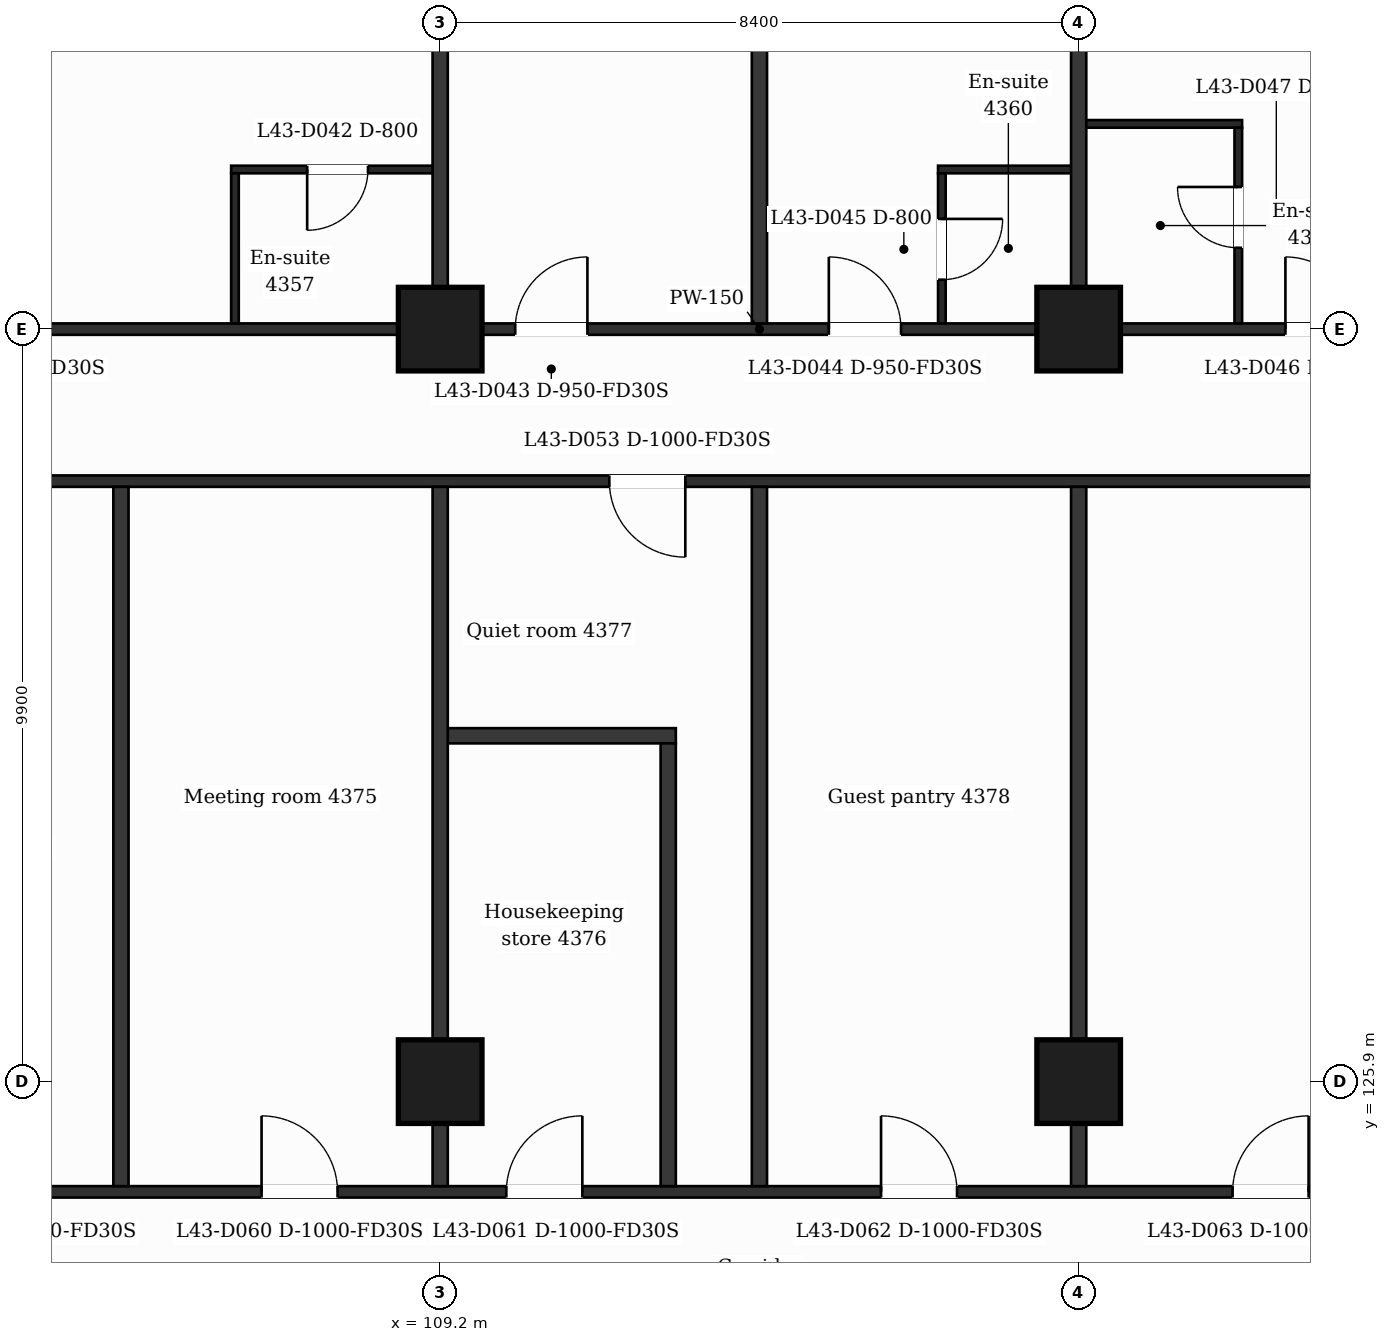
"""IFC4 building model, lengths in metres.
Left out: names, types, materials, properties, quantities, classifications, styles, units other than length and angle.
Written with IfcOpenShell. Run it as: python <this file> out.ifc"""

import sys

from ifc_helpers import new_model, si_unit, direction, frame, frame_2d, origin, origin_2d, place, context, subcontext, project, spatial, rectangle, extrude, element, fill, save


model = new_model("IFC4")
c1 = context("Model", 3, precision=1e-05, world=origin(), true_north=direction((0.0, 1.0)))
c2 = subcontext(c1, "Body", "Model", "MODEL_VIEW")
j1 = project(units=[si_unit("LENGTHUNIT", "METRE"), si_unit("PLANEANGLEUNIT", "RADIAN")], contexts=[c1])
p1 = place(None, origin())
s1 = spatial("IfcSite", under=j1, at=p1, CompositionType="ELEMENT")
p2 = place(p1, origin())
s2 = spatial("IfcBuilding", under=s1, at=p2, CompositionType="ELEMENT")
p3 = place(p2, frame((0.0, 0.0, 181.1)))
s3 = spatial("IfcBuildingStorey", under=s2, at=p3, CompositionType="ELEMENT", Elevation=181.1)
for number, where, z_axis, x_axis in (
    (1, (109.2, 125.9, 0.0), (0.0, 0.0, 1.0), (1.0, 0.0, 0.0)),
    (2, (117.6, 125.9, 0.0), (0.0, 0.0, 1.0), (1.0, 0.0, 0.0)),
    (3, (109.2, 135.8, 0.0), (0.0, 0.0, 1.0), (1.0, 0.0, 0.0)),
    (4, (117.6, 135.8, 0.0), (0.0, 0.0, 1.0), (1.0, 0.0, 0.0)),
):
    element("IfcColumn", number, at=place(p3, frame(where, z_axis=z_axis, x_axis=x_axis)), inside=s3, PredefinedType="COLUMN", context=c2, shape_type="SweptSolid", body=[
        extrude(rectangle(XDim=1.1, YDim=1.1, at=origin_2d()), origin(), (0.0, 0.0, 1.0), 3.7),
    ])
p4 = place(p3, frame((100.8, 124.45, 0.0), z_axis=(0.0, 0.0, 1.0), x_axis=(1.0, 0.0, 0.0)))
e5 = element("IfcWall", 5, at=p4, inside=s3, PredefinedType="PARTITIONING", context=c2, shape_type="SweptSolid", body=[
    extrude(rectangle(XDim=25.2, YDim=0.15, at=frame_2d((12.6, 0.0))), origin(), (0.0, 0.0, 1.0), 3.38),
])
p5 = place(p4, frame((0.975, 0.0, 0.0)))
e6 = element("IfcOpeningElement", 6, at=p5, cuts=e5, PredefinedType="OPENING", context=c2, shape_type="SweptSolid", body=[
    extrude(rectangle(XDim=1.0, YDim=2.1, at=frame_2d((0.5, 1.05))), frame((0.0, 0.085, 0.0), z_axis=(0.0, -1.0, 0.0), x_axis=(1.0, 0.0, 0.0)), (0.0, 0.0, 1.0), 0.17),
])
p6 = place(p4, frame((6.05, 0.0, 0.0)))
e7 = element("IfcOpeningElement", 7, at=p6, cuts=e5, PredefinedType="OPENING", context=c2, shape_type="SweptSolid", body=[
    extrude(rectangle(XDim=1.0, YDim=2.1, at=frame_2d((0.5, 1.05))), frame((0.0, 0.085, 0.0), z_axis=(0.0, -1.0, 0.0), x_axis=(1.0, 0.0, 0.0)), (0.0, 0.0, 1.0), 0.17),
])
p7 = place(p4, frame((9.27, 0.0, 0.0)))
e8 = element("IfcOpeningElement", 8, at=p7, cuts=e5, PredefinedType="OPENING", context=c2, shape_type="SweptSolid", body=[
    extrude(rectangle(XDim=1.0, YDim=2.1, at=frame_2d((0.5, 1.05))), frame((0.0, 0.085, 0.0), z_axis=(0.0, -1.0, 0.0), x_axis=(1.0, 0.0, 0.0)), (0.0, 0.0, 1.0), 0.17),
])
p8 = place(p4, frame((14.2, 0.0, 0.0)))
e9 = element("IfcOpeningElement", 9, at=p8, cuts=e5, PredefinedType="OPENING", context=c2, shape_type="SweptSolid", body=[
    extrude(rectangle(XDim=1.0, YDim=2.1, at=frame_2d((0.5, 1.05))), frame((0.0, 0.085, 0.0), z_axis=(0.0, -1.0, 0.0), x_axis=(1.0, 0.0, 0.0)), (0.0, 0.0, 1.0), 0.17),
])
p9 = place(p4, frame((18.825, 0.0, 0.0)))
e10 = element("IfcOpeningElement", 10, at=p9, cuts=e5, PredefinedType="OPENING", context=c2, shape_type="SweptSolid", body=[
    extrude(rectangle(XDim=1.0, YDim=2.1, at=frame_2d((0.5, 1.05))), frame((0.0, 0.085, 0.0), z_axis=(0.0, -1.0, 0.0), x_axis=(1.0, 0.0, 0.0)), (0.0, 0.0, 1.0), 0.17),
])
p10 = place(p3, frame((109.2, 130.45, 0.0), z_axis=(0.0, 0.0, 1.0), x_axis=(1.0, 0.0, 0.0)))
e11 = element("IfcWall", 11, at=p10, inside=s3, PredefinedType="PARTITIONING", context=c2, shape_type="SweptSolid", body=[
    extrude(rectangle(XDim=3.1, YDim=0.2, at=frame_2d((1.55, 0.0))), origin(), (0.0, 0.0, 1.0), 3.38),
])
p11 = place(p3, frame((100.725, 133.8, 0.0), z_axis=(0.0, 0.0, 1.0), x_axis=(1.0, 0.0, 0.0)))
e12 = element("IfcWall", 12, at=p11, inside=s3, PredefinedType="PARTITIONING", context=c2, shape_type="SweptSolid", body=[
    extrude(rectangle(XDim=25.35, YDim=0.15, at=frame_2d((12.675, 0.0))), origin(), (0.0, 0.0, 1.0), 3.38),
])
p12 = place(p11, frame((10.7, 0.0, 0.0)))
e13 = element("IfcOpeningElement", 13, at=p12, cuts=e12, PredefinedType="OPENING", context=c2, shape_type="SweptSolid", body=[
    extrude(rectangle(XDim=1.0, YDim=2.1, at=frame_2d((0.5, 1.05))), frame((0.0, 0.085, 0.0), z_axis=(0.0, -1.0, 0.0), x_axis=(1.0, 0.0, 0.0)), (0.0, 0.0, 1.0), 0.17),
])
p13 = place(p3, frame((90.895, 135.8, 0.0), z_axis=(0.0, 0.0, 1.0), x_axis=(1.0, 0.0, 0.0)))
e14 = element("IfcWall", 14, at=p13, inside=s3, PredefinedType="PARTITIONING", context=c2, shape_type="SweptSolid", body=[
    extrude(rectangle(XDim=45.011, YDim=0.15, at=frame_2d((22.505, 0.0))), origin(), (0.0, 0.0, 1.0), 3.38),
])
p14 = place(p13, frame((6.906, 0.0, 0.0)))
e15 = element("IfcOpeningElement", 15, at=p14, cuts=e14, PredefinedType="OPENING", context=c2, shape_type="SweptSolid", body=[
    extrude(rectangle(XDim=1.0, YDim=2.1, at=frame_2d((0.5, 1.05))), frame((0.0, 0.085, 0.0), z_axis=(0.0, -1.0, 0.0), x_axis=(1.0, 0.0, 0.0)), (0.0, 0.0, 1.0), 0.17),
])
p15 = place(p13, frame((11.875, 0.0, 0.0)))
e16 = element("IfcOpeningElement", 16, at=p15, cuts=e14, PredefinedType="OPENING", context=c2, shape_type="SweptSolid", body=[
    extrude(rectangle(XDim=0.95, YDim=2.1, at=frame_2d((0.475, 1.05))), frame((0.0, 0.085, 0.0), z_axis=(0.0, -1.0, 0.0), x_axis=(1.0, 0.0, 0.0)), (0.0, 0.0, 1.0), 0.17),
])
p16 = place(p13, frame((19.292, 0.0, 0.0)))
e17 = element("IfcOpeningElement", 17, at=p16, cuts=e14, PredefinedType="OPENING", context=c2, shape_type="SweptSolid", body=[
    extrude(rectangle(XDim=0.95, YDim=2.1, at=frame_2d((0.475, 1.05))), frame((0.0, 0.085, 0.0), z_axis=(0.0, -1.0, 0.0), x_axis=(1.0, 0.0, 0.0)), (0.0, 0.0, 1.0), 0.17),
])
p17 = place(p13, frame((23.418, 0.0, 0.0)))
e18 = element("IfcOpeningElement", 18, at=p17, cuts=e14, PredefinedType="OPENING", context=c2, shape_type="SweptSolid", body=[
    extrude(rectangle(XDim=0.95, YDim=2.1, at=frame_2d((0.475, 1.05))), frame((0.0, 0.085, 0.0), z_axis=(0.0, -1.0, 0.0), x_axis=(1.0, 0.0, 0.0)), (0.0, 0.0, 1.0), 0.17),
])
p18 = place(p13, frame((29.425, 0.0, 0.0)))
e19 = element("IfcOpeningElement", 19, at=p18, cuts=e14, PredefinedType="OPENING", context=c2, shape_type="SweptSolid", body=[
    extrude(rectangle(XDim=0.95, YDim=2.1, at=frame_2d((0.475, 1.05))), frame((0.0, 0.085, 0.0), z_axis=(0.0, -1.0, 0.0), x_axis=(1.0, 0.0, 0.0)), (0.0, 0.0, 1.0), 0.17),
])
p19 = place(p13, frame((31.63, 0.0, 0.0)))
e20 = element("IfcOpeningElement", 20, at=p19, cuts=e14, PredefinedType="OPENING", context=c2, shape_type="SweptSolid", body=[
    extrude(rectangle(XDim=0.95, YDim=2.1, at=frame_2d((0.475, 1.05))), frame((0.0, 0.085, 0.0), z_axis=(0.0, -1.0, 0.0), x_axis=(1.0, 0.0, 0.0)), (0.0, 0.0, 1.0), 0.17),
])
p20 = place(p13, frame((36.775, 0.0, 0.0)))
e21 = element("IfcOpeningElement", 21, at=p20, cuts=e14, PredefinedType="OPENING", context=c2, shape_type="SweptSolid", body=[
    extrude(rectangle(XDim=1.0, YDim=2.1, at=frame_2d((0.5, 1.05))), frame((0.0, 0.085, 0.0), z_axis=(0.0, -1.0, 0.0), x_axis=(1.0, 0.0, 0.0)), (0.0, 0.0, 1.0), 0.17),
])
p21 = place(p3, frame((106.45, 137.9, 0.0), z_axis=(0.0, 0.0, 1.0), x_axis=(1.0, 0.0, 0.0)))
e22 = element("IfcWall", 22, at=p21, inside=s3, PredefinedType="PARTITIONING", context=c2, shape_type="SweptSolid", body=[
    extrude(rectangle(XDim=2.75, YDim=0.1, at=frame_2d((1.375, 0.0))), origin(), (0.0, 0.0, 1.0), 3.38),
])
p22 = place(p21, frame((1.0, 0.0, 0.0)))
e23 = element("IfcOpeningElement", 23, at=p22, cuts=e22, PredefinedType="OPENING", context=c2, shape_type="SweptSolid", body=[
    extrude(rectangle(XDim=0.8, YDim=2.1, at=frame_2d((0.4, 1.05))), frame((0.0, 0.06, 0.0), z_axis=(0.0, -1.0, 0.0), x_axis=(1.0, 0.0, 0.0)), (0.0, 0.0, 1.0), 0.12),
])
p23 = place(p3, frame((115.75, 137.9, 0.0), z_axis=(0.0, 0.0, 1.0), x_axis=(1.0, 0.0, 0.0)))
e24 = element("IfcWall", 24, at=p23, inside=s3, PredefinedType="PARTITIONING", context=c2, shape_type="SweptSolid", body=[
    extrude(rectangle(XDim=1.85, YDim=0.1, at=frame_2d((0.925, 0.0))), origin(), (0.0, 0.0, 1.0), 3.38),
])
p24 = place(p3, frame((117.6, 138.5, 0.0), z_axis=(0.0, 0.0, 1.0), x_axis=(1.0, 0.0, 0.0)))
e25 = element("IfcWall", 25, at=p24, inside=s3, PredefinedType="PARTITIONING", context=c2, shape_type="SweptSolid", body=[
    extrude(rectangle(XDim=2.15, YDim=0.1, at=frame_2d((1.075, 0.0))), origin(), (0.0, 0.0, 1.0), 3.38),
])
p25 = place(p3, frame((105.0, 124.525, 0.0), z_axis=(0.0, 0.0, 1.0), x_axis=(0.0, 1.0, 0.0)))
e26 = element("IfcWall", 26, at=p25, inside=s3, PredefinedType="PARTITIONING", context=c2, shape_type="SweptSolid", body=[
    extrude(rectangle(XDim=9.2, YDim=0.2, at=frame_2d((4.6, 0.0))), origin(), (0.0, 0.0, 1.0), 3.38),
])
p26 = place(p3, frame((106.5, 135.875, 0.0), z_axis=(0.0, 0.0, 1.0), x_axis=(0.0, 1.0, 0.0)))
e27 = element("IfcWall", 27, at=p26, inside=s3, PredefinedType="PARTITIONING", context=c2, shape_type="SweptSolid", body=[
    extrude(rectangle(XDim=1.975, YDim=0.1, at=frame_2d((0.988, 0.0))), origin(), (0.0, 0.0, 1.0), 3.38),
])
p27 = place(p3, frame((109.2, 124.525, 0.0), z_axis=(0.0, 0.0, 1.0), x_axis=(0.0, 1.0, 0.0)))
e28 = element("IfcWall", 28, at=p27, inside=s3, PredefinedType="PARTITIONING", context=c2, shape_type="SweptSolid", body=[
    extrude(rectangle(XDim=9.2, YDim=0.2, at=frame_2d((4.6, 0.0))), origin(), (0.0, 0.0, 1.0), 3.38),
])
p28 = place(p3, frame((109.2, 135.875, 0.0), z_axis=(0.0, 0.0, 1.0), x_axis=(0.0, 1.0, 0.0)))
e29 = element("IfcWall", 29, at=p28, inside=s3, PredefinedType="PARTITIONING", context=c2, shape_type="SweptSolid", body=[
    extrude(rectangle(XDim=7.135, YDim=0.2, at=frame_2d((3.567, 0.0))), origin(), (0.0, 0.0, 1.0), 3.38),
])
p29 = place(p3, frame((112.2, 124.525, 0.0), z_axis=(0.0, 0.0, 1.0), x_axis=(0.0, 1.0, 0.0)))
e30 = element("IfcWall", 30, at=p29, inside=s3, PredefinedType="PARTITIONING", context=c2, shape_type="SweptSolid", body=[
    extrude(rectangle(XDim=5.825, YDim=0.2, at=frame_2d((2.913, 0.0))), origin(), (0.0, 0.0, 1.0), 3.38),
])
p30 = place(p3, frame((113.4, 124.525, 0.0), z_axis=(0.0, 0.0, 1.0), x_axis=(0.0, 1.0, 0.0)))
e31 = element("IfcWall", 31, at=p30, inside=s3, PredefinedType="PARTITIONING", context=c2, shape_type="SweptSolid", body=[
    extrude(rectangle(XDim=9.2, YDim=0.2, at=frame_2d((4.6, 0.0))), origin(), (0.0, 0.0, 1.0), 3.38),
])
p31 = place(p3, frame((113.4, 135.875, 0.0), z_axis=(0.0, 0.0, 1.0), x_axis=(0.0, 1.0, 0.0)))
e32 = element("IfcWall", 32, at=p31, inside=s3, PredefinedType="PARTITIONING", context=c2, shape_type="SweptSolid", body=[
    extrude(rectangle(XDim=8.085, YDim=0.2, at=frame_2d((4.042, 0.0))), origin(), (0.0, 0.0, 1.0), 3.38),
])
p32 = place(p3, frame((115.8, 135.875, 0.0), z_axis=(0.0, 0.0, 1.0), x_axis=(0.0, 1.0, 0.0)))
e33 = element("IfcWall", 33, at=p32, inside=s3, PredefinedType="PARTITIONING", context=c2, shape_type="SweptSolid", body=[
    extrude(rectangle(XDim=1.975, YDim=0.1, at=frame_2d((0.988, 0.0))), origin(), (0.0, 0.0, 1.0), 3.38),
])
p33 = place(p32, frame((0.575, 0.0, 0.0)))
e34 = element("IfcOpeningElement", 34, at=p33, cuts=e33, PredefinedType="OPENING", context=c2, shape_type="SweptSolid", body=[
    extrude(rectangle(XDim=0.8, YDim=2.1, at=frame_2d((0.4, 1.05))), frame((0.0, 0.06, 0.0), z_axis=(0.0, -1.0, 0.0), x_axis=(1.0, 0.0, 0.0)), (0.0, 0.0, 1.0), 0.12),
])
p34 = place(p3, frame((117.6, 124.525, 0.0), z_axis=(0.0, 0.0, 1.0), x_axis=(0.0, 1.0, 0.0)))
e35 = element("IfcWall", 35, at=p34, inside=s3, PredefinedType="PARTITIONING", context=c2, shape_type="SweptSolid", body=[
    extrude(rectangle(XDim=9.2, YDim=0.2, at=frame_2d((4.6, 0.0))), origin(), (0.0, 0.0, 1.0), 3.38),
])
p35 = place(p3, frame((117.6, 135.875, 0.0), z_axis=(0.0, 0.0, 1.0), x_axis=(0.0, 1.0, 0.0)))
e36 = element("IfcWall", 36, at=p35, inside=s3, PredefinedType="PARTITIONING", context=c2, shape_type="SweptSolid", body=[
    extrude(rectangle(XDim=7.135, YDim=0.2, at=frame_2d((3.567, 0.0))), origin(), (0.0, 0.0, 1.0), 3.38),
])
p36 = place(p3, frame((119.7, 135.875, 0.0), z_axis=(0.0, 0.0, 1.0), x_axis=(0.0, 1.0, 0.0)))
e37 = element("IfcWall", 37, at=p36, inside=s3, PredefinedType="PARTITIONING", context=c2, shape_type="SweptSolid", body=[
    extrude(rectangle(XDim=2.575, YDim=0.1, at=frame_2d((1.288, 0.0))), origin(), (0.0, 0.0, 1.0), 3.38),
])
p37 = place(p36, frame((0.995, 0.0, 0.0)))
e38 = element("IfcOpeningElement", 38, at=p37, cuts=e37, PredefinedType="OPENING", context=c2, shape_type="SweptSolid", body=[
    extrude(rectangle(XDim=0.8, YDim=2.1, at=frame_2d((0.4, 1.05))), frame((0.0, 0.06, 0.0), z_axis=(0.0, -1.0, 0.0), x_axis=(1.0, 0.0, 0.0)), (0.0, 0.0, 1.0), 0.12),
])
p38 = place(p22, origin())
e39 = element("IfcDoor", 39, at=p38, inside=s3, OperationType="SINGLE_SWING_LEFT", PredefinedType="DOOR", context=c2, shape_type="SweptSolid", body=[
    extrude(rectangle(XDim=0.8, YDim=2.1, at=frame_2d((0.4, 1.05))), frame((0.0, 0.025, 0.0), z_axis=(0.0, -1.0, 0.0), x_axis=(1.0, 0.0, 0.0)), (0.0, 0.0, 1.0), 0.05),
])
fill(e23, e39)
p39 = place(p16, origin())
e40 = element("IfcDoor", 40, at=p39, inside=s3, OperationType="SINGLE_SWING_RIGHT", PredefinedType="DOOR", context=c2, shape_type="SweptSolid", body=[
    extrude(rectangle(XDim=0.95, YDim=2.1, at=frame_2d((0.475, 1.05))), frame((0.0, 0.025, 0.0), z_axis=(0.0, -1.0, 0.0), x_axis=(1.0, 0.0, 0.0)), (0.0, 0.0, 1.0), 0.05),
])
fill(e17, e40)
p40 = place(p17, origin())
e41 = element("IfcDoor", 41, at=p40, inside=s3, OperationType="SINGLE_SWING_LEFT", PredefinedType="DOOR", context=c2, shape_type="SweptSolid", body=[
    extrude(rectangle(XDim=0.95, YDim=2.1, at=frame_2d((0.475, 1.05))), frame((0.0, 0.025, 0.0), z_axis=(0.0, -1.0, 0.0), x_axis=(1.0, 0.0, 0.0)), (0.0, 0.0, 1.0), 0.05),
])
fill(e18, e41)
p41 = place(p33, origin())
e42 = element("IfcDoor", 42, at=p41, inside=s3, OperationType="SINGLE_SWING_RIGHT", PredefinedType="DOOR", context=c2, shape_type="SweptSolid", body=[
    extrude(rectangle(XDim=0.8, YDim=2.1, at=frame_2d((0.4, 1.05))), frame((0.0, 0.025, 0.0), z_axis=(0.0, -1.0, 0.0), x_axis=(1.0, 0.0, 0.0)), (0.0, 0.0, 1.0), 0.05),
])
fill(e34, e42)
p42 = place(p18, origin())
e43 = element("IfcDoor", 43, at=p42, inside=s3, OperationType="SINGLE_SWING_LEFT", PredefinedType="DOOR", context=c2, shape_type="SweptSolid", body=[
    extrude(rectangle(XDim=0.95, YDim=2.1, at=frame_2d((0.475, 1.05))), frame((0.0, 0.025, 0.0), z_axis=(0.0, -1.0, 0.0), x_axis=(1.0, 0.0, 0.0)), (0.0, 0.0, 1.0), 0.05),
])
fill(e19, e43)
p43 = place(p37, origin())
e44 = element("IfcDoor", 44, at=p43, inside=s3, OperationType="SINGLE_SWING_RIGHT", PredefinedType="DOOR", context=c2, shape_type="SweptSolid", body=[
    extrude(rectangle(XDim=0.8, YDim=2.1, at=frame_2d((0.4, 1.05))), frame((0.0, 0.025, 0.0), z_axis=(0.0, -1.0, 0.0), x_axis=(1.0, 0.0, 0.0)), (0.0, 0.0, 1.0), 0.05),
])
fill(e38, e44)
p44 = place(p12, origin())
e45 = element("IfcDoor", 45, at=p44, inside=s3, OperationType="SINGLE_SWING_RIGHT", PredefinedType="DOOR", context=c2, shape_type="SweptSolid", body=[
    extrude(rectangle(XDim=1.0, YDim=2.1, at=frame_2d((0.5, 1.05))), frame((0.0, 0.025, 0.0), z_axis=(0.0, -1.0, 0.0), x_axis=(1.0, 0.0, 0.0)), (0.0, 0.0, 1.0), 0.05),
])
fill(e13, e45)
p45 = place(p6, origin())
e46 = element("IfcDoor", 46, at=p45, inside=s3, OperationType="SINGLE_SWING_LEFT", PredefinedType="DOOR", context=c2, shape_type="SweptSolid", body=[
    extrude(rectangle(XDim=1.0, YDim=2.1, at=frame_2d((0.5, 1.05))), frame((0.0, 0.025, 0.0), z_axis=(0.0, -1.0, 0.0), x_axis=(1.0, 0.0, 0.0)), (0.0, 0.0, 1.0), 0.05),
])
fill(e7, e46)
p46 = place(p7, origin())
e47 = element("IfcDoor", 47, at=p46, inside=s3, OperationType="SINGLE_SWING_RIGHT", PredefinedType="DOOR", context=c2, shape_type="SweptSolid", body=[
    extrude(rectangle(XDim=1.0, YDim=2.1, at=frame_2d((0.5, 1.05))), frame((0.0, 0.025, 0.0), z_axis=(0.0, -1.0, 0.0), x_axis=(1.0, 0.0, 0.0)), (0.0, 0.0, 1.0), 0.05),
])
fill(e8, e47)
p47 = place(p8, origin())
e48 = element("IfcDoor", 48, at=p47, inside=s3, OperationType="SINGLE_SWING_LEFT", PredefinedType="DOOR", context=c2, shape_type="SweptSolid", body=[
    extrude(rectangle(XDim=1.0, YDim=2.1, at=frame_2d((0.5, 1.05))), frame((0.0, 0.025, 0.0), z_axis=(0.0, -1.0, 0.0), x_axis=(1.0, 0.0, 0.0)), (0.0, 0.0, 1.0), 0.05),
])
fill(e9, e48)
p48 = place(p9, origin())
e49 = element("IfcDoor", 49, at=p48, inside=s3, OperationType="SINGLE_SWING_RIGHT", PredefinedType="DOOR", context=c2, shape_type="SweptSolid", body=[
    extrude(rectangle(XDim=1.0, YDim=2.1, at=frame_2d((0.5, 1.05))), frame((0.0, 0.025, 0.0), z_axis=(0.0, -1.0, 0.0), x_axis=(1.0, 0.0, 0.0)), (0.0, 0.0, 1.0), 0.05),
])
fill(e10, e49)
save(model, sys.argv[1])
